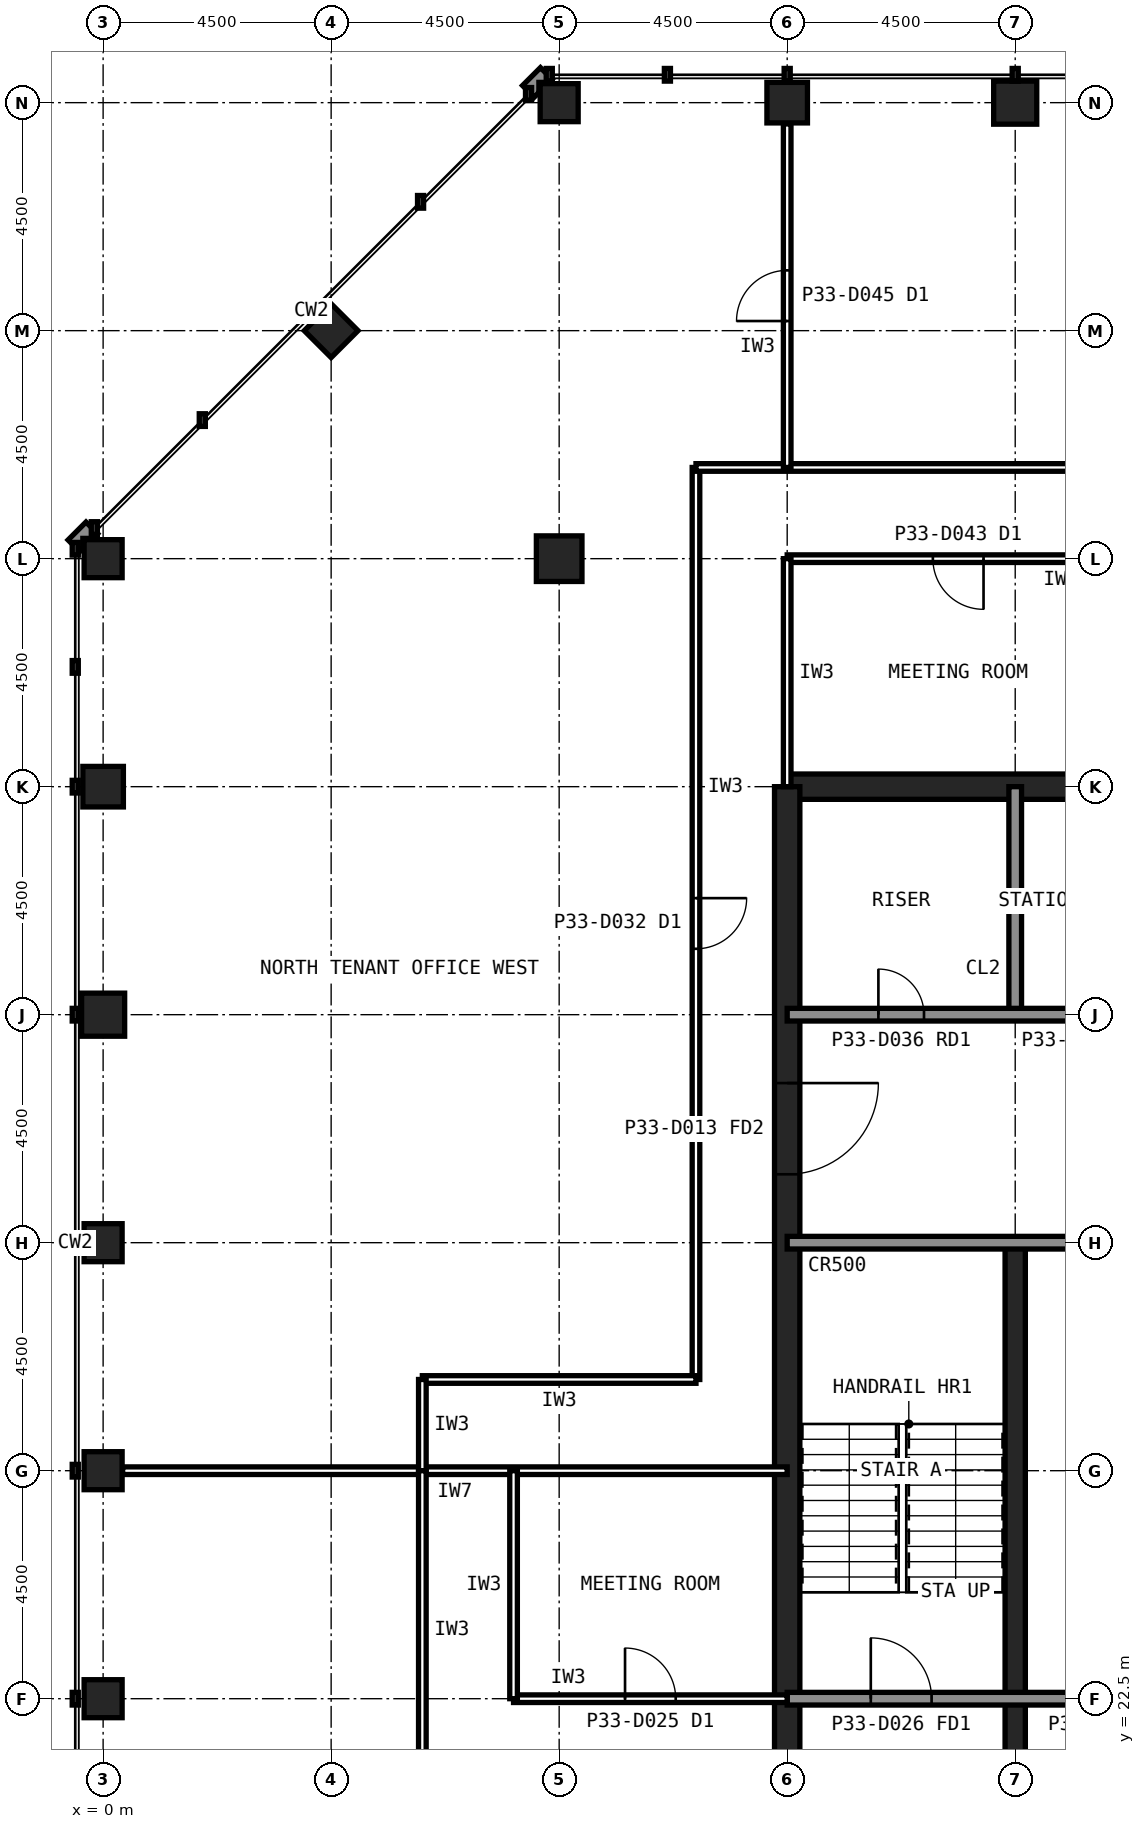
"""IFC4 building model, lengths in metres.
Left out: names, types, materials, properties, quantities, classifications, styles, units other than length and angle.
Written with IfcOpenShell. Run it as: python <this file> out.ifc"""

import sys

from ifc_helpers import new_model, si_unit, direction, frame, frame_2d, origin, origin_2d, place, context, subcontext, project, spatial, rectangle, hollow_rectangle, extrude, element, fill, save


model = new_model("IFC4")
c1 = context("Model", 3, precision=1e-05, world=origin(), true_north=direction((0.0, 1.0)))
c2 = subcontext(c1, "Body", "Model", "MODEL_VIEW")
j1 = project(units=[si_unit("LENGTHUNIT", "METRE"), si_unit("PLANEANGLEUNIT", "RADIAN")], contexts=[c1])
p1 = place(None, origin())
s1 = spatial("IfcSite", under=j1, at=p1, CompositionType="ELEMENT")
p2 = place(p1, origin())
s2 = spatial("IfcBuilding", under=s1, at=p2, CompositionType="ELEMENT")
p3 = place(p2, frame((0.0, 0.0, 143.6)))
s3 = spatial("IfcBuildingStorey", under=s2, at=p3, CompositionType="ELEMENT", Elevation=143.6)
p4 = place(p3, frame((18.0, 54.0, 0.0), z_axis=(0.0, 0.0, 1.0), x_axis=(1.0, 0.0, 0.0)))
e1 = element("IfcColumn", 1, at=p4, inside=s3, PredefinedType="COLUMN", context=c2, shape_type="SweptSolid", body=[
    extrude(hollow_rectangle(XDim=0.85, YDim=0.85, WallThickness=0.05, at=origin_2d()), origin(), (0.0, 0.0, 1.0), 4.0),
])
p5 = place(p3, frame((13.5, 54.0, 0.0), z_axis=(0.0, 0.0, 1.0), x_axis=(1.0, 0.0, 0.0)))
e2 = element("IfcColumn", 2, at=p5, inside=s3, PredefinedType="COLUMN", context=c2, shape_type="SweptSolid", body=[
    extrude(hollow_rectangle(XDim=0.8, YDim=0.8, WallThickness=0.045, at=origin_2d()), origin(), (0.0, 0.0, 1.0), 4.0),
])
for number, where, z_axis, x_axis in (
    (3, (9.0, 54.0, 0.0), (0.0, 0.0, 1.0), (1.0, 0.0, 0.0)),
    (4, (0.0, 45.0, 0.0), (0.0, 0.0, 1.0), (1.0, 0.0, 0.0)),
):
    element("IfcColumn", number, at=place(p3, frame(where, z_axis=z_axis, x_axis=x_axis)), inside=s3, PredefinedType="COLUMN", context=c2, shape_type="SweptSolid", body=[
        extrude(hollow_rectangle(XDim=0.75, YDim=0.75, WallThickness=0.04, at=origin_2d()), origin(), (0.0, 0.0, 1.0), 4.0),
    ])
p6 = place(p3, frame((0.0, 40.5, 0.0), z_axis=(0.0, 0.0, 1.0), x_axis=(1.0, 0.0, 0.0)))
e5 = element("IfcColumn", 5, at=p6, inside=s3, PredefinedType="COLUMN", context=c2, shape_type="SweptSolid", body=[
    extrude(hollow_rectangle(XDim=0.8, YDim=0.8, WallThickness=0.045, at=origin_2d()), origin(), (0.0, 0.0, 1.0), 4.0),
])
p7 = place(p3, frame((0.0, 36.0, 0.0), z_axis=(0.0, 0.0, 1.0), x_axis=(1.0, 0.0, 0.0)))
e6 = element("IfcColumn", 6, at=p7, inside=s3, PredefinedType="COLUMN", context=c2, shape_type="SweptSolid", body=[
    extrude(hollow_rectangle(XDim=0.85, YDim=0.85, WallThickness=0.05, at=origin_2d()), origin(), (0.0, 0.0, 1.0), 4.0),
])
for number, where, z_axis, x_axis in (
    (7, (0.0, 31.5, 0.0), (0.0, 0.0, 1.0), (1.0, 0.0, 0.0)),
    (8, (0.0, 27.0, 0.0), (0.0, 0.0, 1.0), (1.0, 0.0, 0.0)),
    (9, (0.0, 22.5, 0.0), (0.0, 0.0, 1.0), (1.0, 0.0, 0.0)),
    (10, (4.5, 49.5, 0.0), (0.0, 0.0, 1.0), (0.707, 0.707, 0.0)),
):
    element("IfcColumn", number, at=place(p3, frame(where, z_axis=z_axis, x_axis=x_axis)), inside=s3, PredefinedType="COLUMN", context=c2, shape_type="SweptSolid", body=[
        extrude(hollow_rectangle(XDim=0.75, YDim=0.75, WallThickness=0.04, at=origin_2d()), origin(), (0.0, 0.0, 1.0), 4.0),
    ])
p8 = place(p3, frame((9.0, 45.0, 0.0), z_axis=(0.0, 0.0, 1.0), x_axis=(1.0, 0.0, 0.0)))
e11 = element("IfcColumn", 11, at=p8, inside=s3, PredefinedType="COLUMN", context=c2, shape_type="SweptSolid", body=[
    extrude(hollow_rectangle(XDim=0.9, YDim=0.9, WallThickness=0.063, at=origin_2d()), origin(), (0.0, 0.0, 1.0), 4.0),
])
p9 = place(p3, frame((40.5, 40.5, 0.0), z_axis=(0.0, 0.0, 1.0), x_axis=(-1.0, 0.0, 0.0)))
e12 = element("IfcWall", 12, at=p9, inside=s3, PredefinedType="SHEAR", context=c2, shape_type="SweptSolid", body=[
    extrude(rectangle(XDim=27.0, YDim=0.5, at=frame_2d((13.5, 0.0))), origin(), (0.0, 0.0, 1.0), 4.0),
])
p10 = place(p3, frame((13.5, 40.5, 0.0), z_axis=(0.0, 0.0, 1.0), x_axis=(0.0, -1.0, 0.0)))
e13 = element("IfcWall", 13, at=p10, inside=s3, PredefinedType="SHEAR", context=c2, shape_type="SweptSolid", body=[
    extrude(rectangle(XDim=27.0, YDim=0.5, at=frame_2d((13.5, 0.0))), origin(), (0.0, 0.0, 1.0), 4.0),
])
p11 = place(p10, frame((19.65, 0.0, 0.0)))
e14 = element("IfcOpeningElement", 14, at=p11, cuts=e13, PredefinedType="OPENING", context=c2, shape_type="SweptSolid", body=[
    extrude(rectangle(XDim=1.2, YDim=2.1, at=frame_2d((0.6, 1.05))), frame((0.0, 0.26, 0.0), z_axis=(0.0, -1.0, 0.0), x_axis=(1.0, 0.0, 0.0)), (0.0, 0.0, 1.0), 0.52),
])
p12 = place(p10, frame((5.85, 0.0, 0.0)))
e15 = element("IfcOpeningElement", 15, at=p12, cuts=e13, PredefinedType="OPENING", context=c2, shape_type="SweptSolid", body=[
    extrude(rectangle(XDim=1.8, YDim=2.1, at=frame_2d((0.9, 1.05))), frame((0.0, 0.26, 0.0), z_axis=(0.0, -1.0, 0.0), x_axis=(1.0, 0.0, 0.0)), (0.0, 0.0, 1.0), 0.52),
])
p13 = place(p3, frame((18.0, 13.5, 0.0), z_axis=(0.0, 0.0, 1.0), x_axis=(0.0, 1.0, 0.0)))
e16 = element("IfcWall", 16, at=p13, inside=s3, PredefinedType="SHEAR", context=c2, shape_type="SweptSolid", body=[
    extrude(rectangle(XDim=18.0, YDim=0.4, at=frame_2d((9.0, 0.0))), origin(), (0.0, 0.0, 1.0), 4.0),
])
p14 = place(p3, frame((18.0, 36.0, 0.0), z_axis=(0.0, 0.0, 1.0), x_axis=(0.0, 1.0, 0.0)))
e17 = element("IfcWall", 17, at=p14, inside=s3, PredefinedType="SOLIDWALL", context=c2, shape_type="SweptSolid", body=[
    extrude(rectangle(XDim=4.5, YDim=0.25, at=frame_2d((2.25, 0.0))), origin(), (0.0, 0.0, 1.0), 3.84),
])
p15 = place(p3, frame((13.5, 36.0, 0.0), z_axis=(0.0, 0.0, 1.0), x_axis=(1.0, 0.0, 0.0)))
e18 = element("IfcWall", 18, at=p15, inside=s3, PredefinedType="SOLIDWALL", context=c2, shape_type="SweptSolid", body=[
    extrude(rectangle(XDim=27.0, YDim=0.25, at=frame_2d((13.5, 0.0))), origin(), (0.0, 0.0, 1.0), 3.84),
])
p16 = place(p15, frame((1.8, 0.0, 0.0)))
e19 = element("IfcOpeningElement", 19, at=p16, cuts=e18, PredefinedType="OPENING", context=c2, shape_type="SweptSolid", body=[
    extrude(rectangle(XDim=0.9, YDim=2.1, at=frame_2d((0.45, 1.05))), frame((0.0, 0.135, 0.0), z_axis=(0.0, -1.0, 0.0), x_axis=(1.0, 0.0, 0.0)), (0.0, 0.0, 1.0), 0.27),
])
p17 = place(p15, frame((5.55, 0.0, 0.0)))
e20 = element("IfcOpeningElement", 20, at=p17, cuts=e18, PredefinedType="OPENING", context=c2, shape_type="SweptSolid", body=[
    extrude(rectangle(XDim=0.9, YDim=2.1, at=frame_2d((0.45, 1.05))), frame((0.0, 0.135, 0.0), z_axis=(0.0, -1.0, 0.0), x_axis=(1.0, 0.0, 0.0)), (0.0, 0.0, 1.0), 0.27),
])
p18 = place(p15, frame((8.55, 0.0, 0.0)))
e21 = element("IfcOpeningElement", 21, at=p18, cuts=e18, PredefinedType="OPENING", context=c2, shape_type="SweptSolid", body=[
    extrude(rectangle(XDim=0.9, YDim=2.1, at=frame_2d((0.45, 1.05))), frame((0.0, 0.135, 0.0), z_axis=(0.0, -1.0, 0.0), x_axis=(1.0, 0.0, 0.0)), (0.0, 0.0, 1.0), 0.27),
])
p19 = place(p15, frame((11.55, 0.0, 0.0)))
e22 = element("IfcOpeningElement", 22, at=p19, cuts=e18, PredefinedType="OPENING", context=c2, shape_type="SweptSolid", body=[
    extrude(rectangle(XDim=0.9, YDim=2.1, at=frame_2d((0.45, 1.05))), frame((0.0, 0.135, 0.0), z_axis=(0.0, -1.0, 0.0), x_axis=(1.0, 0.0, 0.0)), (0.0, 0.0, 1.0), 0.27),
])
p20 = place(p15, frame((24.1, 0.0, 0.0)))
e23 = element("IfcOpeningElement", 23, at=p20, cuts=e18, PredefinedType="OPENING", context=c2, shape_type="SweptSolid", body=[
    extrude(rectangle(XDim=1.3, YDim=2.2, at=frame_2d((0.65, 1.1))), frame((0.0, 0.135, 0.0), z_axis=(0.0, -1.0, 0.0), x_axis=(1.0, 0.0, 0.0)), (0.0, 0.0, 1.0), 0.27),
])
p21 = place(p3, frame((13.5, 22.5, 0.0), z_axis=(0.0, 0.0, 1.0), x_axis=(1.0, 0.0, 0.0)))
e24 = element("IfcWall", 24, at=p21, inside=s3, PredefinedType="SOLIDWALL", context=c2, shape_type="SweptSolid", body=[
    extrude(rectangle(XDim=27.0, YDim=0.25, at=frame_2d((13.5, 0.0))), origin(), (0.0, 0.0, 1.0), 3.84),
])
p22 = place(p21, frame((1.65, 0.0, 0.0)))
e25 = element("IfcOpeningElement", 25, at=p22, cuts=e24, PredefinedType="OPENING", context=c2, shape_type="SweptSolid", body=[
    extrude(rectangle(XDim=1.2, YDim=2.1, at=frame_2d((0.6, 1.05))), frame((0.0, 0.135, 0.0), z_axis=(0.0, -1.0, 0.0), x_axis=(1.0, 0.0, 0.0)), (0.0, 0.0, 1.0), 0.27),
])
p23 = place(p21, frame((6.025, 0.0, 0.0)))
e26 = element("IfcOpeningElement", 26, at=p23, cuts=e24, PredefinedType="OPENING", context=c2, shape_type="SweptSolid", body=[
    extrude(rectangle(XDim=1.0, YDim=2.1, at=frame_2d((0.5, 1.05))), frame((0.0, 0.135, 0.0), z_axis=(0.0, -1.0, 0.0), x_axis=(1.0, 0.0, 0.0)), (0.0, 0.0, 1.0), 0.27),
])
p24 = place(p21, frame((10.525, 0.0, 0.0)))
e27 = element("IfcOpeningElement", 27, at=p24, cuts=e24, PredefinedType="OPENING", context=c2, shape_type="SweptSolid", body=[
    extrude(rectangle(XDim=1.0, YDim=2.1, at=frame_2d((0.5, 1.05))), frame((0.0, 0.135, 0.0), z_axis=(0.0, -1.0, 0.0), x_axis=(1.0, 0.0, 0.0)), (0.0, 0.0, 1.0), 0.27),
])
p25 = place(p21, frame((19.75, 0.0, 0.0)))
e28 = element("IfcOpeningElement", 28, at=p25, cuts=e24, PredefinedType="OPENING", context=c2, shape_type="SweptSolid", body=[
    extrude(rectangle(XDim=1.0, YDim=2.1, at=frame_2d((0.5, 1.05))), frame((0.0, 0.135, 0.0), z_axis=(0.0, -1.0, 0.0), x_axis=(1.0, 0.0, 0.0)), (0.0, 0.0, 1.0), 0.27),
])
p26 = place(p21, frame((15.05, 0.0, 0.0)))
e29 = element("IfcOpeningElement", 29, at=p26, cuts=e24, PredefinedType="OPENING", context=c2, shape_type="SweptSolid", body=[
    extrude(rectangle(XDim=1.4, YDim=2.4, at=frame_2d((0.7, 1.2))), frame((0.0, 0.135, 0.0), z_axis=(0.0, -1.0, 0.0), x_axis=(1.0, 0.0, 0.0)), (0.0, 0.0, 1.0), 0.27),
])
p27 = place(p3, frame((13.5, 31.5, 0.0), z_axis=(0.0, 0.0, 1.0), x_axis=(1.0, 0.0, 0.0)))
e30 = element("IfcWall", 30, at=p27, inside=s3, PredefinedType="SOLIDWALL", context=c2, shape_type="SweptSolid", body=[
    extrude(rectangle(XDim=27.0, YDim=0.25, at=frame_2d((13.5, 0.0))), origin(), (0.0, 0.0, 1.0), 3.84),
])
p28 = place(p27, frame((24.15, 0.0, 0.0)))
e31 = element("IfcOpeningElement", 31, at=p28, cuts=e30, PredefinedType="OPENING", context=c2, shape_type="SweptSolid", body=[
    extrude(rectangle(XDim=1.2, YDim=2.1, at=frame_2d((0.6, 1.05))), frame((0.0, 0.135, 0.0), z_axis=(0.0, -1.0, 0.0), x_axis=(1.0, 0.0, 0.0)), (0.0, 0.0, 1.0), 0.27),
])
p29 = place(p27, frame((15.3, 0.0, 0.0)))
e32 = element("IfcOpeningElement", 32, at=p29, cuts=e30, PredefinedType="OPENING", context=c2, shape_type="SweptSolid", body=[
    extrude(rectangle(XDim=0.9, YDim=2.1, at=frame_2d((0.45, 1.05))), frame((0.0, 0.135, 0.0), z_axis=(0.0, -1.0, 0.0), x_axis=(1.0, 0.0, 0.0)), (0.0, 0.0, 1.0), 0.27),
])
p30 = place(p27, frame((19.8, 0.0, 0.0)))
e33 = element("IfcOpeningElement", 33, at=p30, cuts=e30, PredefinedType="OPENING", context=c2, shape_type="SweptSolid", body=[
    extrude(rectangle(XDim=0.9, YDim=2.1, at=frame_2d((0.45, 1.05))), frame((0.0, 0.135, 0.0), z_axis=(0.0, -1.0, 0.0), x_axis=(1.0, 0.0, 0.0)), (0.0, 0.0, 1.0), 0.27),
])
p31 = place(p3, frame((0.385, 27.0, 0.0), z_axis=(0.0, 0.0, 1.0), x_axis=(1.0, 0.0, 0.0)))
e34 = element("IfcWall", 34, at=p31, inside=s3, PredefinedType="PARTITIONING", context=c2, shape_type="SweptSolid", body=[
    extrude(rectangle(XDim=13.115, YDim=0.15, at=frame_2d((6.558, 0.0))), origin(), (0.0, 0.0, 1.0), 2.989),
])
p32 = place(p3, frame((11.7, 46.8, 0.0), z_axis=(0.0, 0.0, 1.0), x_axis=(0.0, -1.0, 0.0)))
e35 = element("IfcWall", 35, at=p32, inside=s3, PredefinedType="PARTITIONING", context=c2, shape_type="SweptSolid", body=[
    extrude(rectangle(XDim=18.0, YDim=0.15, at=frame_2d((9.0, 0.0))), origin(), (0.0, 0.0, 1.0), 3.84),
])
p33 = place(p32, frame((8.5, 0.0, 0.0)))
e36 = element("IfcOpeningElement", 36, at=p33, cuts=e35, PredefinedType="OPENING", context=c2, shape_type="SweptSolid", body=[
    extrude(rectangle(XDim=1.0, YDim=2.1, at=frame_2d((0.5, 1.05))), frame((0.0, 0.085, 0.0), z_axis=(0.0, -1.0, 0.0), x_axis=(1.0, 0.0, 0.0)), (0.0, 0.0, 1.0), 0.17),
])
p34 = place(p3, frame((28.8, 46.8, 0.0), z_axis=(0.0, 0.0, 1.0), x_axis=(-1.0, 0.0, 0.0)))
e37 = element("IfcWall", 37, at=p34, inside=s3, PredefinedType="PARTITIONING", context=c2, shape_type="SweptSolid", body=[
    extrude(rectangle(XDim=17.1, YDim=0.15, at=frame_2d((8.55, 0.0))), origin(), (0.0, 0.0, 1.0), 3.84),
])
p35 = place(p34, frame((8.05, 0.0, 0.0)))
e38 = element("IfcOpeningElement", 38, at=p35, cuts=e37, PredefinedType="OPENING", context=c2, shape_type="SweptSolid", body=[
    extrude(rectangle(XDim=1.0, YDim=2.1, at=frame_2d((0.5, 1.05))), frame((0.0, 0.085, 0.0), z_axis=(0.0, -1.0, 0.0), x_axis=(1.0, 0.0, 0.0)), (0.0, 0.0, 1.0), 0.17),
])
p36 = place(p3, frame((11.7, 28.8, 0.0), z_axis=(0.0, 0.0, 1.0), x_axis=(-1.0, 0.0, 0.0)))
e39 = element("IfcWall", 39, at=p36, inside=s3, PredefinedType="PARTITIONING", context=c2, shape_type="SweptSolid", body=[
    extrude(rectangle(XDim=5.4, YDim=0.15, at=frame_2d((2.7, 0.0))), origin(), (0.0, 0.0, 1.0), 3.84),
])
p37 = place(p3, frame((6.3, 28.8, 0.0), z_axis=(0.0, 0.0, 1.0), x_axis=(0.0, -1.0, 0.0)))
e40 = element("IfcWall", 40, at=p37, inside=s3, PredefinedType="PARTITIONING", context=c2, shape_type="SweptSolid", body=[
    extrude(rectangle(XDim=1.8, YDim=0.15, at=frame_2d((0.9, 0.0))), origin(), (0.0, 0.0, 1.0), 3.84),
])
p38 = place(p3, frame((6.3, 27.0, 0.0), z_axis=(0.0, 0.0, 1.0), x_axis=(0.0, -1.0, 0.0)))
e41 = element("IfcWall", 41, at=p38, inside=s3, PredefinedType="PARTITIONING", context=c2, shape_type="SweptSolid", body=[
    extrude(rectangle(XDim=6.3, YDim=0.15, at=frame_2d((3.15, 0.0))), origin(), (0.0, 0.0, 1.0), 3.84),
])
p39 = place(p3, frame((8.1, 22.5, 0.0), z_axis=(0.0, 0.0, 1.0), x_axis=(1.0, 0.0, 0.0)))
e42 = element("IfcWall", 42, at=p39, inside=s3, PredefinedType="PARTITIONING", context=c2, shape_type="SweptSolid", body=[
    extrude(rectangle(XDim=5.4, YDim=0.15, at=frame_2d((2.7, 0.0))), origin(), (0.0, 0.0, 1.0), 2.989),
])
p40 = place(p39, frame((2.2, 0.0, 0.0)))
e43 = element("IfcOpeningElement", 43, at=p40, cuts=e42, PredefinedType="OPENING", context=c2, shape_type="SweptSolid", body=[
    extrude(rectangle(XDim=1.0, YDim=2.1, at=frame_2d((0.5, 1.05))), frame((0.0, 0.085, 0.0), z_axis=(0.0, -1.0, 0.0), x_axis=(1.0, 0.0, 0.0)), (0.0, 0.0, 1.0), 0.17),
])
p41 = place(p3, frame((8.1, 27.0, 0.0), z_axis=(0.0, 0.0, 1.0), x_axis=(0.0, -1.0, 0.0)))
e44 = element("IfcWall", 44, at=p41, inside=s3, PredefinedType="PARTITIONING", context=c2, shape_type="SweptSolid", body=[
    extrude(rectangle(XDim=4.5, YDim=0.15, at=frame_2d((2.25, 0.0))), origin(), (0.0, 0.0, 1.0), 3.84),
])
p42 = place(p3, frame((20.25, 45.0, 0.0), z_axis=(0.0, 0.0, 1.0), x_axis=(-1.0, 0.0, 0.0)))
e45 = element("IfcWall", 45, at=p42, inside=s3, PredefinedType="PARTITIONING", context=c2, shape_type="SweptSolid", body=[
    extrude(rectangle(XDim=6.75, YDim=0.15, at=frame_2d((3.375, 0.0))), origin(), (0.0, 0.0, 1.0), 3.84),
])
p43 = place(p42, frame((2.875, 0.0, 0.0)))
e46 = element("IfcOpeningElement", 46, at=p43, cuts=e45, PredefinedType="OPENING", context=c2, shape_type="SweptSolid", body=[
    extrude(rectangle(XDim=1.0, YDim=2.1, at=frame_2d((0.5, 1.05))), frame((0.0, 0.085, 0.0), z_axis=(0.0, -1.0, 0.0), x_axis=(1.0, 0.0, 0.0)), (0.0, 0.0, 1.0), 0.17),
])
p44 = place(p3, frame((13.5, 45.0, 0.0), z_axis=(0.0, 0.0, 1.0), x_axis=(0.0, -1.0, 0.0)))
e47 = element("IfcWall", 47, at=p44, inside=s3, PredefinedType="PARTITIONING", context=c2, shape_type="SweptSolid", body=[
    extrude(rectangle(XDim=4.5, YDim=0.15, at=frame_2d((2.25, 0.0))), origin(), (0.0, 0.0, 1.0), 2.989),
])
p45 = place(p3, frame((13.5, 46.8, 0.0), z_axis=(0.0, 0.0, 1.0), x_axis=(0.0, 1.0, 0.0)))
e48 = element("IfcWall", 48, at=p45, inside=s3, PredefinedType="PARTITIONING", context=c2, shape_type="SweptSolid", body=[
    extrude(rectangle(XDim=6.78, YDim=0.15, at=frame_2d((3.39, 0.0))), origin(), (0.0, 0.0, 1.0), 2.989),
])
p46 = place(p45, frame((2.89, 0.0, 0.0)))
e49 = element("IfcOpeningElement", 49, at=p46, cuts=e48, PredefinedType="OPENING", context=c2, shape_type="SweptSolid", body=[
    extrude(rectangle(XDim=1.0, YDim=2.1, at=frame_2d((0.5, 1.05))), frame((0.0, 0.085, 0.0), z_axis=(0.0, -1.0, 0.0), x_axis=(1.0, 0.0, 0.0)), (0.0, 0.0, 1.0), 0.17),
])
p47 = place(p12, origin())
e50 = element("IfcDoor", 50, at=p47, inside=s3, OperationType="SINGLE_SWING_LEFT", PredefinedType="DOOR", context=c2, shape_type="SweptSolid", body=[
    extrude(rectangle(XDim=1.8, YDim=2.1, at=frame_2d((0.9, 1.05))), frame((0.0, 0.025, 0.0), z_axis=(0.0, -1.0, 0.0), x_axis=(1.0, 0.0, 0.0)), (0.0, 0.0, 1.0), 0.05),
])
fill(e15, e50)
p48 = place(p22, origin())
e51 = element("IfcDoor", 51, at=p48, inside=s3, OperationType="SINGLE_SWING_LEFT", PredefinedType="DOOR", context=c2, shape_type="SweptSolid", body=[
    extrude(rectangle(XDim=1.2, YDim=2.1, at=frame_2d((0.6, 1.05))), frame((0.0, 0.025, 0.0), z_axis=(0.0, -1.0, 0.0), x_axis=(1.0, 0.0, 0.0)), (0.0, 0.0, 1.0), 0.05),
])
fill(e25, e51)
p49 = place(p16, origin())
e52 = element("IfcDoor", 52, at=p49, inside=s3, OperationType="SINGLE_SWING_LEFT", PredefinedType="DOOR", context=c2, shape_type="SweptSolid", body=[
    extrude(rectangle(XDim=0.9, YDim=2.1, at=frame_2d((0.45, 1.05))), frame((0.0, 0.025, 0.0), z_axis=(0.0, -1.0, 0.0), x_axis=(1.0, 0.0, 0.0)), (0.0, 0.0, 1.0), 0.05),
])
fill(e19, e52)
p50 = place(p33, origin())
e53 = element("IfcDoor", 53, at=p50, inside=s3, OperationType="SINGLE_SWING_LEFT", PredefinedType="DOOR", context=c2, shape_type="SweptSolid", body=[
    extrude(rectangle(XDim=1.0, YDim=2.1, at=frame_2d((0.5, 1.05))), frame((0.0, 0.025, 0.0), z_axis=(0.0, -1.0, 0.0), x_axis=(1.0, 0.0, 0.0)), (0.0, 0.0, 1.0), 0.05),
])
fill(e36, e53)
p51 = place(p40, origin())
e54 = element("IfcDoor", 54, at=p51, inside=s3, OperationType="SINGLE_SWING_LEFT", PredefinedType="DOOR", context=c2, shape_type="SweptSolid", body=[
    extrude(rectangle(XDim=1.0, YDim=2.1, at=frame_2d((0.5, 1.05))), frame((0.0, 0.025, 0.0), z_axis=(0.0, -1.0, 0.0), x_axis=(1.0, 0.0, 0.0)), (0.0, 0.0, 1.0), 0.05),
])
fill(e43, e54)
p52 = place(p43, origin())
e55 = element("IfcDoor", 55, at=p52, inside=s3, OperationType="SINGLE_SWING_LEFT", PredefinedType="DOOR", context=c2, shape_type="SweptSolid", body=[
    extrude(rectangle(XDim=1.0, YDim=2.1, at=frame_2d((0.5, 1.05))), frame((0.0, 0.025, 0.0), z_axis=(0.0, -1.0, 0.0), x_axis=(1.0, 0.0, 0.0)), (0.0, 0.0, 1.0), 0.05),
])
fill(e46, e55)
p53 = place(p46, origin())
e56 = element("IfcDoor", 56, at=p53, inside=s3, OperationType="SINGLE_SWING_LEFT", PredefinedType="DOOR", context=c2, shape_type="SweptSolid", body=[
    extrude(rectangle(XDim=1.0, YDim=2.1, at=frame_2d((0.5, 1.05))), frame((0.0, 0.025, 0.0), z_axis=(0.0, -1.0, 0.0), x_axis=(1.0, 0.0, 0.0)), (0.0, 0.0, 1.0), 0.05),
])
fill(e49, e56)
save(model, sys.argv[1])
